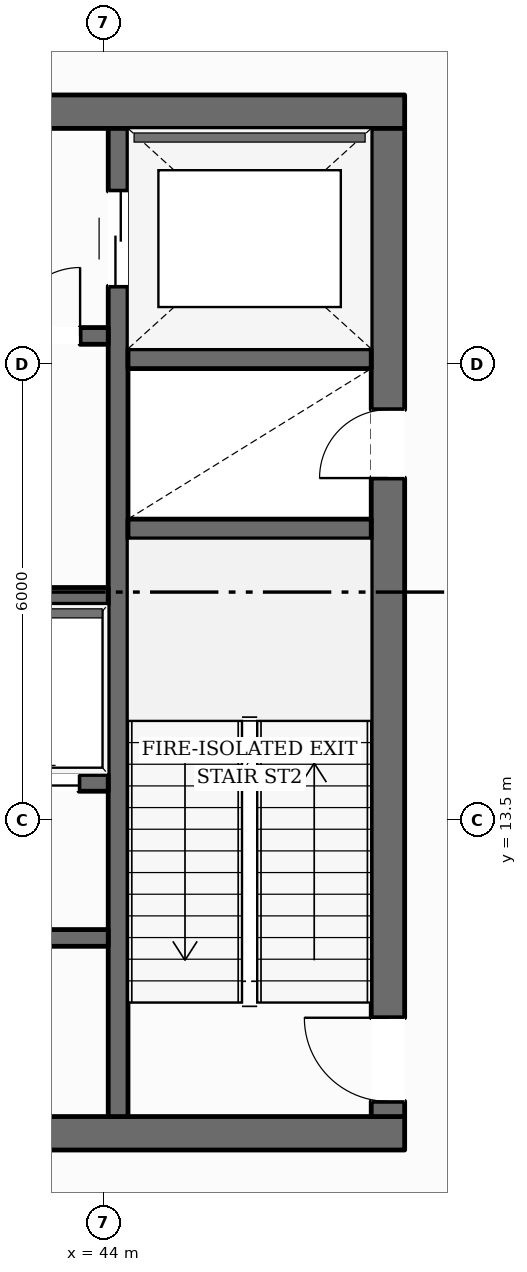
"""IFC4 building model, lengths in metres.
Left out: names, types, materials, properties, quantities, classifications, styles, units other than length and angle.
Written with IfcOpenShell. Run it as: python <this file> out.ifc"""

import sys

from ifc_helpers import new_model, si_unit, direction, frame, frame_2d, origin, place, context, subcontext, project, spatial, rectangle, extrude, element, fill, save


model = new_model("IFC4")
c1 = context("Model", 3, precision=1e-05, world=origin(), true_north=direction((0.0, 1.0)))
c2 = subcontext(c1, "Body", "Model", "MODEL_VIEW")
j1 = project(units=[si_unit("LENGTHUNIT", "METRE"), si_unit("PLANEANGLEUNIT", "RADIAN")], contexts=[c1])
p1 = place(None, origin())
s1 = spatial("IfcSite", under=j1, at=p1, CompositionType="ELEMENT")
p2 = place(p1, origin())
s2 = spatial("IfcBuilding", under=s1, at=p2, CompositionType="ELEMENT")
p3 = place(p2, frame((0.0, 0.0, 160.0)))
s3 = spatial("IfcBuildingStorey", under=s2, at=p3, CompositionType="ELEMENT", Elevation=160.0)
p4 = place(p3, frame((28.04, 9.38, 0.0), z_axis=(0.0, 0.0, 1.0), x_axis=(1.0, 0.0, 0.0)))
e1 = element("IfcWall", 1, at=p4, inside=s3, PredefinedType="SOLIDWALL", context=c2, shape_type="SweptSolid", body=[
    extrude(rectangle(XDim=19.92, YDim=0.44, at=frame_2d((9.96, 0.0))), origin(), (0.0, 0.0, 1.0), 4.75),
])
p5 = place(p4, frame((10.46, 0.0, 0.0)))
e2 = element("IfcOpeningElement", 2, at=p5, cuts=e1, PredefinedType="OPENING", context=c2, shape_type="SweptSolid", body=[
    extrude(rectangle(XDim=1.4, YDim=2.2, at=frame_2d((0.7, 1.1))), frame((0.0, 0.23, 0.0), z_axis=(0.0, -1.0, 0.0), x_axis=(1.0, 0.0, 0.0)), (0.0, 0.0, 1.0), 0.46),
])
p6 = place(p3, frame((28.04, 22.82, 0.0), z_axis=(0.0, 0.0, 1.0), x_axis=(1.0, 0.0, 0.0)))
e3 = element("IfcWall", 3, at=p6, inside=s3, PredefinedType="SOLIDWALL", context=c2, shape_type="SweptSolid", body=[
    extrude(rectangle(XDim=19.92, YDim=0.44, at=frame_2d((9.96, 0.0))), origin(), (0.0, 0.0, 1.0), 4.75),
])
p7 = place(p6, frame((6.235, 0.0, 0.0)))
e4 = element("IfcOpeningElement", 4, at=p7, cuts=e3, PredefinedType="OPENING", context=c2, shape_type="SweptSolid", body=[
    extrude(rectangle(XDim=1.05, YDim=2.15, at=frame_2d((0.525, 1.075))), frame((0.0, 0.23, 0.0), z_axis=(0.0, -1.0, 0.0), x_axis=(1.0, 0.0, 0.0)), (0.0, 0.0, 1.0), 0.46),
])
p8 = place(p6, frame((12.635, 0.0, 0.0)))
e5 = element("IfcOpeningElement", 5, at=p8, cuts=e3, PredefinedType="OPENING", context=c2, shape_type="SweptSolid", body=[
    extrude(rectangle(XDim=1.05, YDim=2.15, at=frame_2d((0.525, 1.075))), frame((0.0, 0.23, 0.0), z_axis=(0.0, -1.0, 0.0), x_axis=(1.0, 0.0, 0.0)), (0.0, 0.0, 1.0), 0.46),
])
p9 = place(p3, frame((47.74, 9.6, 0.0), z_axis=(0.0, 0.0, 1.0), x_axis=(0.0, 1.0, 0.0)))
e6 = element("IfcWall", 6, at=p9, inside=s3, PredefinedType="SOLIDWALL", context=c2, shape_type="SweptSolid", body=[
    extrude(rectangle(XDim=13.0, YDim=0.44, at=frame_2d((6.5, 0.0))), origin(), (0.0, 0.0, 1.0), 4.75),
])
p10 = place(p9, frame((0.2, 0.0, 0.0)))
e7 = element("IfcOpeningElement", 7, at=p10, cuts=e6, PredefinedType="OPENING", context=c2, shape_type="SweptSolid", body=[
    extrude(rectangle(XDim=1.1, YDim=2.15, at=frame_2d((0.55, 1.075))), frame((0.0, 0.23, 0.0), z_axis=(0.0, -1.0, 0.0), x_axis=(1.0, 0.0, 0.0)), (0.0, 0.0, 1.0), 0.46),
])
p11 = place(p9, frame((8.4, 0.0, 0.0)))
e8 = element("IfcOpeningElement", 8, at=p11, cuts=e6, PredefinedType="OPENING", context=c2, shape_type="SweptSolid", body=[
    extrude(rectangle(XDim=0.9, YDim=2.1, at=frame_2d((0.45, 1.05))), frame((0.0, 0.23, 0.0), z_axis=(0.0, -1.0, 0.0), x_axis=(1.0, 0.0, 0.0)), (0.0, 0.0, 1.0), 0.46),
])
p12 = place(p3, frame((44.19, 9.6, 0.0), z_axis=(0.0, 0.0, 1.0), x_axis=(0.0, 1.0, 0.0)))
e9 = element("IfcWall", 9, at=p12, inside=s3, PredefinedType="SHEAR", context=c2, shape_type="SweptSolid", body=[
    extrude(rectangle(XDim=13.0, YDim=0.26, at=frame_2d((6.5, 0.0))), origin(), (0.0, 0.0, 1.0), 4.75),
])
p13 = place(p12, frame((10.925, 0.0, 0.0)))
e10 = element("IfcOpeningElement", 10, at=p13, cuts=e9, PredefinedType="OPENING", context=c2, shape_type="SweptSolid", body=[
    extrude(rectangle(XDim=1.25, YDim=2.25, at=frame_2d((0.625, 1.125))), frame((0.0, 0.14, 0.0), z_axis=(0.0, -1.0, 0.0), x_axis=(1.0, 0.0, 0.0)), (0.0, 0.0, 1.0), 0.28),
])
for number, where, z_axis, x_axis in (
    (11, (44.32, 17.33, 0.0), (0.0, 0.0, 1.0), (1.0, 0.0, 0.0)),
    (12, (44.32, 19.57, 0.0), (0.0, 0.0, 1.0), (1.0, 0.0, 0.0)),
):
    element("IfcWall", number, at=place(p3, frame(where, z_axis=z_axis, x_axis=x_axis)), inside=s3, PredefinedType="SHEAR", context=c2, shape_type="SweptSolid", body=[
        extrude(rectangle(XDim=3.2, YDim=0.26, at=frame_2d((1.6, 0.0))), origin(), (0.0, 0.0, 1.0), 4.75),
    ])
p14 = place(p3, frame((31.94, 19.87, 0.0), z_axis=(0.0, 0.0, 1.0), x_axis=(1.0, 0.0, 0.0)))
e13 = element("IfcWall", 13, at=p14, inside=s3, PredefinedType="SOLIDWALL", context=c2, shape_type="SweptSolid", body=[
    extrude(rectangle(XDim=12.12, YDim=0.22, at=frame_2d((6.06, 0.0))), origin(), (0.0, 0.0, 1.0), 4.75),
])
p15 = place(p14, frame((6.3, 0.0, 0.0)))
e14 = element("IfcOpeningElement", 14, at=p15, cuts=e13, PredefinedType="OPENING", context=c2, shape_type="SweptSolid", body=[
    extrude(rectangle(XDim=1.1, YDim=2.15, at=frame_2d((0.55, 1.075))), frame((0.0, 0.12, 0.0), z_axis=(0.0, -1.0, 0.0), x_axis=(1.0, 0.0, 0.0)), (0.0, 0.0, 1.0), 0.24),
])
p16 = place(p14, frame((8.61, 0.0, 0.0)))
e15 = element("IfcOpeningElement", 15, at=p16, cuts=e13, PredefinedType="OPENING", context=c2, shape_type="SweptSolid", body=[
    extrude(rectangle(XDim=0.9, YDim=2.1, at=frame_2d((0.45, 1.05))), frame((0.0, 0.12, 0.0), z_axis=(0.0, -1.0, 0.0), x_axis=(1.0, 0.0, 0.0)), (0.0, 0.0, 1.0), 0.24),
])
p17 = place(p14, frame((10.85, 0.0, 0.0)))
e16 = element("IfcOpeningElement", 16, at=p17, cuts=e13, PredefinedType="OPENING", context=c2, shape_type="SweptSolid", body=[
    extrude(rectangle(XDim=0.9, YDim=2.1, at=frame_2d((0.45, 1.05))), frame((0.0, 0.12, 0.0), z_axis=(0.0, -1.0, 0.0), x_axis=(1.0, 0.0, 0.0)), (0.0, 0.0, 1.0), 0.24),
])
p18 = place(p3, frame((31.94, 16.45, 0.0), z_axis=(0.0, 0.0, 1.0), x_axis=(1.0, 0.0, 0.0)))
e17 = element("IfcWall", 17, at=p18, inside=s3, PredefinedType="SOLIDWALL", context=c2, shape_type="SweptSolid", body=[
    extrude(rectangle(XDim=12.12, YDim=0.22, at=frame_2d((6.06, 0.0))), origin(), (0.0, 0.0, 1.0), 4.75),
])
p19 = place(p3, frame((31.94, 13.99, 0.0), z_axis=(0.0, 0.0, 1.0), x_axis=(1.0, 0.0, 0.0)))
e18 = element("IfcWall", 18, at=p19, inside=s3, PredefinedType="SOLIDWALL", context=c2, shape_type="SweptSolid", body=[
    extrude(rectangle(XDim=12.12, YDim=0.22, at=frame_2d((6.06, 0.0))), origin(), (0.0, 0.0, 1.0), 4.75),
])
p20 = place(p19, frame((2.51, 0.0, 0.0)))
e19 = element("IfcOpeningElement", 19, at=p20, cuts=e18, PredefinedType="OPENING", context=c2, shape_type="SweptSolid", body=[
    extrude(rectangle(XDim=0.9, YDim=2.1, at=frame_2d((0.45, 1.05))), frame((0.0, 0.12, 0.0), z_axis=(0.0, -1.0, 0.0), x_axis=(1.0, 0.0, 0.0)), (0.0, 0.0, 1.0), 0.24),
])
p21 = place(p19, frame((6.535, 0.0, 0.0)))
e20 = element("IfcOpeningElement", 20, at=p21, cuts=e18, PredefinedType="OPENING", context=c2, shape_type="SweptSolid", body=[
    extrude(rectangle(XDim=1.1, YDim=2.2, at=frame_2d((0.55, 1.1))), frame((0.0, 0.12, 0.0), z_axis=(0.0, -1.0, 0.0), x_axis=(1.0, 0.0, 0.0)), (0.0, 0.0, 1.0), 0.24),
])
p22 = place(p19, frame((8.585, 0.0, 0.0)))
e21 = element("IfcOpeningElement", 21, at=p22, cuts=e18, PredefinedType="OPENING", context=c2, shape_type="SweptSolid", body=[
    extrude(rectangle(XDim=1.1, YDim=2.2, at=frame_2d((0.55, 1.1))), frame((0.0, 0.12, 0.0), z_axis=(0.0, -1.0, 0.0), x_axis=(1.0, 0.0, 0.0)), (0.0, 0.0, 1.0), 0.24),
])
p23 = place(p19, frame((10.635, 0.0, 0.0)))
e22 = element("IfcOpeningElement", 22, at=p23, cuts=e18, PredefinedType="OPENING", context=c2, shape_type="SweptSolid", body=[
    extrude(rectangle(XDim=1.1, YDim=2.2, at=frame_2d((0.55, 1.1))), frame((0.0, 0.12, 0.0), z_axis=(0.0, -1.0, 0.0), x_axis=(1.0, 0.0, 0.0)), (0.0, 0.0, 1.0), 0.24),
])
p24 = place(p3, frame((40.28, 11.95, 0.0), z_axis=(0.0, 0.0, 1.0), x_axis=(1.0, 0.0, 0.0)))
e23 = element("IfcWall", 23, at=p24, inside=s3, PredefinedType="SOLIDWALL", context=c2, shape_type="SweptSolid", body=[
    extrude(rectangle(XDim=3.78, YDim=0.22, at=frame_2d((1.89, 0.0))), origin(), (0.0, 0.0, 1.0), 4.75),
])
p25 = place(p24, frame((1.55, 0.0, 0.0)))
e24 = element("IfcOpeningElement", 24, at=p25, cuts=e23, PredefinedType="OPENING", context=c2, shape_type="SweptSolid", body=[
    extrude(rectangle(XDim=0.9, YDim=2.1, at=frame_2d((0.45, 1.05))), frame((0.0, 0.12, 0.0), z_axis=(0.0, -1.0, 0.0), x_axis=(1.0, 0.0, 0.0)), (0.0, 0.0, 1.0), 0.24),
])
p26 = place(p3, frame((42.777, 44.5, 0.0), z_axis=(0.0, 0.0, 1.0), x_axis=(0.492483231086, -0.870321933022, 0.0)))
e25 = element("IfcWall", 25, at=p26, inside=s3, PredefinedType="STANDARD", context=c2, shape_type="SweptSolid", body=[
    extrude(rectangle(XDim=36.803, YDim=0.35, at=frame_2d((18.401, 0.0))), origin(), (0.0, 0.0, 1.0), 4.282),
])
p27 = place(p26, frame((32.343, 0.0, 0.65)))
e26 = element("IfcOpeningElement", 26, at=p27, cuts=e25, PredefinedType="OPENING", context=c2, shape_type="SweptSolid", body=[
    extrude(rectangle(XDim=2.0, YDim=2.25, at=frame_2d((1.0, 1.125))), frame((0.0, 0.185, 0.0), z_axis=(0.0, -1.0, 0.0), x_axis=(1.0, 0.0, 0.0)), (0.0, 0.0, 1.0), 0.37),
])
p28 = place(p26, frame((2.468, 0.0, 0.65)))
e27 = element("IfcOpeningElement", 27, at=p28, cuts=e25, PredefinedType="OPENING", context=c2, shape_type="SweptSolid", body=[
    extrude(rectangle(XDim=2.0, YDim=2.25, at=frame_2d((1.0, 1.125))), frame((0.0, 0.185, 0.0), z_axis=(0.0, -1.0, 0.0), x_axis=(1.0, 0.0, 0.0)), (0.0, 0.0, 1.0), 0.37),
])
p29 = place(p10, origin())
e28 = element("IfcDoor", 28, at=p29, inside=s3, OperationType="SINGLE_SWING_RIGHT", PredefinedType="DOOR", context=c2, shape_type="SweptSolid", body=[
    extrude(rectangle(XDim=1.1, YDim=2.15, at=frame_2d((0.55, 1.075))), frame((0.0, 0.025, 0.0), z_axis=(0.0, -1.0, 0.0), x_axis=(1.0, 0.0, 0.0)), (0.0, 0.0, 1.0), 0.05),
])
fill(e7, e28)
p30 = place(p11, origin())
e29 = element("IfcDoor", 29, at=p30, inside=s3, OperationType="SINGLE_SWING_LEFT", PredefinedType="DOOR", context=c2, shape_type="SweptSolid", body=[
    extrude(rectangle(XDim=0.9, YDim=2.1, at=frame_2d((0.45, 1.05))), frame((0.0, 0.025, 0.0), z_axis=(0.0, -1.0, 0.0), x_axis=(1.0, 0.0, 0.0)), (0.0, 0.0, 1.0), 0.05),
])
fill(e8, e29)
p31 = place(p13, origin())
e30 = element("IfcDoor", 30, at=p31, inside=s3, OperationType="DOUBLE_DOOR_SLIDING", PredefinedType="DOOR", context=c2, shape_type="SweptSolid", body=[
    extrude(rectangle(XDim=1.25, YDim=2.25, at=frame_2d((0.625, 1.125))), frame((0.0, 0.025, 0.0), z_axis=(0.0, -1.0, 0.0), x_axis=(1.0, 0.0, 0.0)), (0.0, 0.0, 1.0), 0.05),
])
fill(e10, e30)
p32 = place(p23, origin())
e31 = element("IfcDoor", 31, at=p32, inside=s3, OperationType="DOUBLE_DOOR_SLIDING", PredefinedType="DOOR", context=c2, shape_type="SweptSolid", body=[
    extrude(rectangle(XDim=1.1, YDim=2.2, at=frame_2d((0.55, 1.1))), frame((0.0, 0.025, 0.0), z_axis=(0.0, -1.0, 0.0), x_axis=(1.0, 0.0, 0.0)), (0.0, 0.0, 1.0), 0.05),
])
fill(e22, e31)
p33 = place(p17, origin())
e32 = element("IfcDoor", 32, at=p33, inside=s3, OperationType="SINGLE_SWING_RIGHT", PredefinedType="DOOR", context=c2, shape_type="SweptSolid", body=[
    extrude(rectangle(XDim=0.9, YDim=2.1, at=frame_2d((0.45, 1.05))), frame((0.0, 0.025, 0.0), z_axis=(0.0, -1.0, 0.0), x_axis=(1.0, 0.0, 0.0)), (0.0, 0.0, 1.0), 0.05),
])
fill(e16, e32)
save(model, sys.argv[1])
